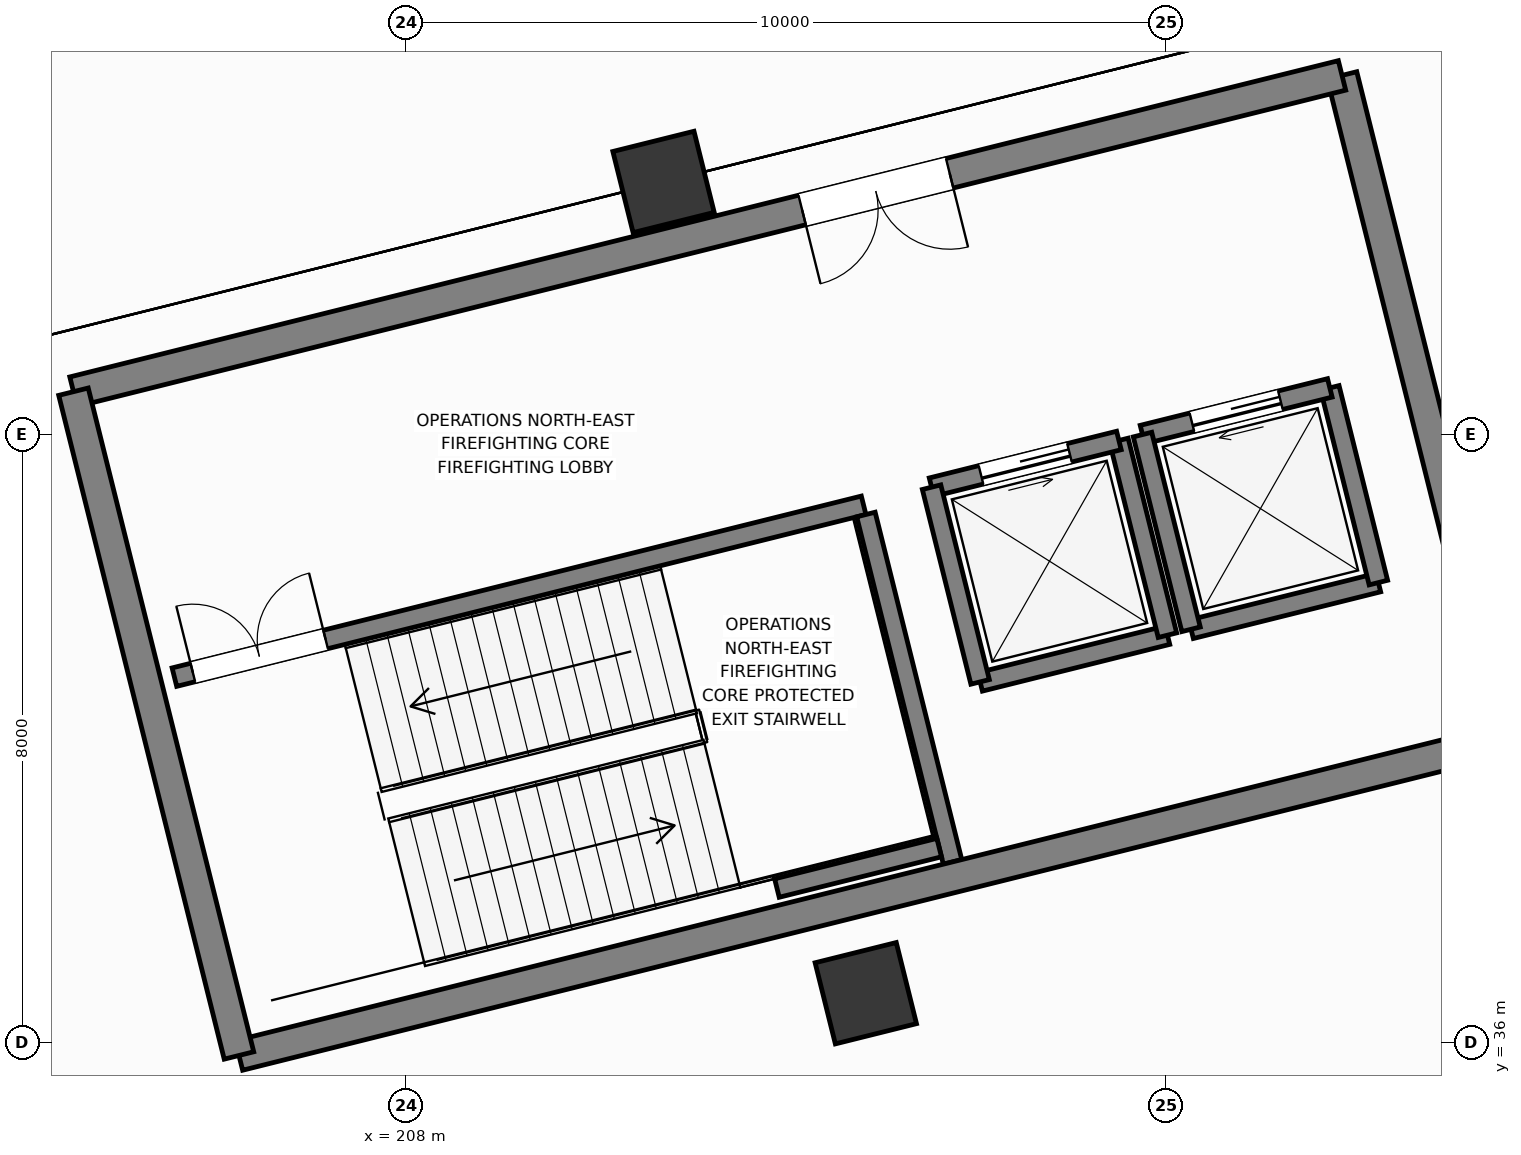
"""IFC4 building model, lengths in metres.
Left out: names, types, materials, properties, quantities, classifications, styles, units other than length and angle.
Written with IfcOpenShell. Run it as: python <this file> out.ifc"""

import sys

from ifc_helpers import new_model, si_unit, direction, frame, frame_2d, origin, origin_2d, place, context, subcontext, project, spatial, rectangle, extrude, element, fill, save


model = new_model("IFC4")
c1 = context("Model", 3, precision=1e-05, world=origin(), true_north=direction((0.0, 1.0)))
c2 = subcontext(c1, "Body", "Model", "MODEL_VIEW")
j1 = project(units=[si_unit("LENGTHUNIT", "METRE"), si_unit("PLANEANGLEUNIT", "RADIAN")], contexts=[c1])
p1 = place(None, origin())
s1 = spatial("IfcSite", under=j1, at=p1, CompositionType="ELEMENT")
p2 = place(p1, origin())
s2 = spatial("IfcBuilding", under=s1, at=p2, CompositionType="ELEMENT")
p3 = place(p2, frame((0.0, 0.0, -5.4)))
s3 = spatial("IfcBuildingStorey", under=s2, at=p3, CompositionType="ELEMENT", Elevation=-5.4)
for number, where, z_axis, x_axis in (
    (1, (214.044, 36.652, 0.0), (0.0, 0.0, 1.0), (0.97, 0.242, 0.0)),
    (2, (211.383, 47.325, 0.0), (0.0, 0.0, 1.0), (0.97, 0.242, 0.0)),
):
    element("IfcColumn", number, at=place(p3, frame(where, z_axis=z_axis, x_axis=x_axis)), inside=s3, PredefinedType="COLUMN", context=c2, shape_type="SweptSolid", body=[
        extrude(rectangle(XDim=1.1, YDim=1.1, at=origin_2d()), origin(), (0.0, 0.0, 1.0), 5.4),
    ])
p4 = place(p3, frame((215.548, 40.748, 0.0), z_axis=(0.0, 0.0, 1.0), x_axis=(0.97029284861, 0.241933436994, 0.0)))
e3 = element("IfcWall", 3, at=p4, inside=s3, PredefinedType="SOLIDWALL", context=c2, shape_type="SweptSolid", body=[
    extrude(rectangle(XDim=2.54, YDim=0.25, at=frame_2d((1.27, 0.0))), origin(), (0.0, 0.0, 1.0), 5.02),
])
p5 = place(p3, frame((218.012, 41.362, 0.0), z_axis=(0.0, 0.0, 1.0), x_axis=(-0.241938414856, 0.970291607413, 0.0)))
e4 = element("IfcWall", 4, at=p5, inside=s3, PredefinedType="SOLIDWALL", context=c2, shape_type="SweptSolid", body=[
    extrude(rectangle(XDim=2.64, YDim=0.25, at=frame_2d((1.32, 0.0))), origin(), (0.0, 0.0, 1.0), 5.02),
])
p6 = place(p3, frame((217.374, 43.924, 0.0), z_axis=(0.0, 0.0, 1.0), x_axis=(-0.97029284861, -0.241933436994, 0.0)))
e5 = element("IfcWall", 5, at=p6, inside=s3, PredefinedType="SOLIDWALL", context=c2, shape_type="SweptSolid", body=[
    extrude(rectangle(XDim=2.54, YDim=0.25, at=frame_2d((1.27, 0.0))), origin(), (0.0, 0.0, 1.0), 5.02),
])
p7 = place(p6, frame((0.67, 0.0, 0.0)))
e6 = element("IfcOpeningElement", 6, at=p7, cuts=e5, PredefinedType="OPENING", context=c2, shape_type="SweptSolid", body=[
    extrude(rectangle(XDim=1.2, YDim=2.2, at=frame_2d((0.6, 1.1))), frame((0.0, 0.135, 0.0), z_axis=(0.0, -1.0, 0.0), x_axis=(1.0, 0.0, 0.0)), (0.0, 0.0, 1.0), 0.27),
])
p8 = place(p3, frame((214.909, 43.309, 0.0), z_axis=(0.0, 0.0, 1.0), x_axis=(0.241938414856, -0.970291607413, 0.0)))
e7 = element("IfcWall", 7, at=p8, inside=s3, PredefinedType="SOLIDWALL", context=c2, shape_type="SweptSolid", body=[
    extrude(rectangle(XDim=2.64, YDim=0.25, at=frame_2d((1.32, 0.0))), origin(), (0.0, 0.0, 1.0), 5.02),
])
p9 = place(p3, frame((218.323, 41.44, 0.0), z_axis=(0.0, 0.0, 1.0), x_axis=(0.97029284861, 0.241933436994, 0.0)))
e8 = element("IfcWall", 8, at=p9, inside=s3, PredefinedType="SOLIDWALL", context=c2, shape_type="SweptSolid", body=[
    extrude(rectangle(XDim=2.54, YDim=0.25, at=frame_2d((1.27, 0.0))), origin(), (0.0, 0.0, 1.0), 5.02),
])
p10 = place(p3, frame((220.787, 42.054, 0.0), z_axis=(0.0, 0.0, 1.0), x_axis=(-0.241938414856, 0.970291607413, 0.0)))
e9 = element("IfcWall", 9, at=p10, inside=s3, PredefinedType="SOLIDWALL", context=c2, shape_type="SweptSolid", body=[
    extrude(rectangle(XDim=2.64, YDim=0.25, at=frame_2d((1.32, 0.0))), origin(), (0.0, 0.0, 1.0), 5.02),
])
p11 = place(p3, frame((220.149, 44.616, 0.0), z_axis=(0.0, 0.0, 1.0), x_axis=(-0.97029284861, -0.241933436994, 0.0)))
e10 = element("IfcWall", 10, at=p11, inside=s3, PredefinedType="SOLIDWALL", context=c2, shape_type="SweptSolid", body=[
    extrude(rectangle(XDim=2.54, YDim=0.25, at=frame_2d((1.27, 0.0))), origin(), (0.0, 0.0, 1.0), 5.02),
])
p12 = place(p11, frame((0.67, 0.0, 0.0)))
e11 = element("IfcOpeningElement", 11, at=p12, cuts=e10, PredefinedType="OPENING", context=c2, shape_type="SweptSolid", body=[
    extrude(rectangle(XDim=1.2, YDim=2.2, at=frame_2d((0.6, 1.1))), frame((0.0, 0.135, 0.0), z_axis=(0.0, -1.0, 0.0), x_axis=(1.0, 0.0, 0.0)), (0.0, 0.0, 1.0), 0.27),
])
p13 = place(p3, frame((217.684, 44.001, 0.0), z_axis=(0.0, 0.0, 1.0), x_axis=(0.241938414856, -0.970291607413, 0.0)))
e12 = element("IfcWall", 12, at=p13, inside=s3, PredefinedType="SOLIDWALL", context=c2, shape_type="SweptSolid", body=[
    extrude(rectangle(XDim=2.64, YDim=0.25, at=frame_2d((1.32, 0.0))), origin(), (0.0, 0.0, 1.0), 5.02),
])
p14 = place(p3, frame((204.948, 40.81, 0.0), z_axis=(0.0, 0.0, 1.0), x_axis=(0.970297151331, 0.241916179943, 0.0)))
e13 = element("IfcWall", 13, at=p14, inside=s3, PredefinedType="SOLIDWALL", context=c2, shape_type="SweptSolid", body=[
    extrude(rectangle(XDim=9.345, YDim=0.25, at=frame_2d((4.673, 0.0))), origin(), (0.0, 0.0, 1.0), 5.02),
])
p15 = place(p14, frame((0.25, 0.0, 0.0)))
e14 = element("IfcOpeningElement", 14, at=p15, cuts=e13, PredefinedType="OPENING", context=c2, shape_type="SweptSolid", body=[
    extrude(rectangle(XDim=1.8, YDim=2.25, at=frame_2d((0.9, 1.125))), frame((0.0, 0.135, 0.0), z_axis=(0.0, -1.0, 0.0), x_axis=(1.0, 0.0, 0.0)), (0.0, 0.0, 1.0), 0.27),
])
p16 = place(p3, frame((215.185, 38.38, 0.0), z_axis=(0.0, 0.0, 1.0), x_axis=(-0.241911120435, 0.970298412763, 0.0)))
e15 = element("IfcWall", 15, at=p16, inside=s3, PredefinedType="SOLIDWALL", context=c2, shape_type="SweptSolid", body=[
    extrude(rectangle(XDim=4.71, YDim=0.25, at=frame_2d((2.355, 0.0))), origin(), (0.0, 0.0, 1.0), 5.02),
])
p17 = place(p3, frame((212.875, 38.035, 0.0), z_axis=(0.0, 0.0, 1.0), x_axis=(0.97029738597, 0.241915238833, 0.0)))
e16 = element("IfcWall", 16, at=p17, inside=s3, PredefinedType="SOLIDWALL", context=c2, shape_type="SweptSolid", body=[
    extrude(rectangle(XDim=2.2, YDim=0.25, at=frame_2d((1.1, 0.0))), origin(), (0.0, 0.0, 1.0), 5.02),
])
p18 = place(p3, frame((205.797, 35.833, 0.0), z_axis=(0.0, 0.0, 1.0), x_axis=(0.970295179998, 0.241924086589, 0.0)))
e17 = element("IfcWall", 17, at=p18, inside=s3, PredefinedType="SHEAR", context=c2, shape_type="SweptSolid", body=[
    extrude(rectangle(XDim=17.2, YDim=0.4, at=frame_2d((8.6, 0.0))), origin(), (0.0, 0.0, 1.0), 5.02),
])
p19 = place(p3, frame((222.486, 39.994, 0.0), z_axis=(0.0, 0.0, 1.0), x_axis=(-0.241923808098, 0.970295249435, 0.0)))
e18 = element("IfcWall", 18, at=p19, inside=s3, PredefinedType="SHEAR", context=c2, shape_type="SweptSolid", body=[
    extrude(rectangle(XDim=9.0, YDim=0.4, at=frame_2d((4.5, 0.0))), origin(), (0.0, 0.0, 1.0), 5.02),
])
p20 = place(p3, frame((220.309, 48.727, 0.0), z_axis=(0.0, 0.0, 1.0), x_axis=(-0.970296544738, -0.241918612906, 0.0)))
e19 = element("IfcWall", 19, at=p20, inside=s3, PredefinedType="SHEAR", context=c2, shape_type="SweptSolid", body=[
    extrude(rectangle(XDim=17.2, YDim=0.4, at=frame_2d((8.6, 0.0))), origin(), (0.0, 0.0, 1.0), 5.02),
])
p21 = place(p20, frame((5.32, 0.0, 0.0)))
e20 = element("IfcOpeningElement", 20, at=p21, cuts=e19, PredefinedType="OPENING", context=c2, shape_type="SweptSolid", body=[
    extrude(rectangle(XDim=2.0, YDim=2.3, at=frame_2d((1.0, 1.15))), frame((0.0, 0.21, 0.0), z_axis=(0.0, -1.0, 0.0), x_axis=(1.0, 0.0, 0.0)), (0.0, 0.0, 1.0), 0.42),
])
p22 = place(p3, frame((203.62, 44.566, 0.0), z_axis=(0.0, 0.0, 1.0), x_axis=(0.241921199913, -0.97029589973, 0.0)))
e21 = element("IfcWall", 21, at=p22, inside=s3, PredefinedType="SHEAR", context=c2, shape_type="SweptSolid", body=[
    extrude(rectangle(XDim=9.0, YDim=0.4, at=frame_2d((4.5, 0.0))), origin(), (0.0, 0.0, 1.0), 5.02),
])
p23 = place(p7, origin())
e22 = element("IfcDoor", 22, at=p23, inside=s3, OperationType="SLIDING_TO_LEFT", PredefinedType="DOOR", context=c2, shape_type="SweptSolid", body=[
    extrude(rectangle(XDim=1.2, YDim=2.2, at=frame_2d((0.6, 1.1))), frame((0.0, 0.025, 0.0), z_axis=(0.0, -1.0, 0.0), x_axis=(1.0, 0.0, 0.0)), (0.0, 0.0, 1.0), 0.05),
])
fill(e6, e22)
p24 = place(p12, origin())
e23 = element("IfcDoor", 23, at=p24, inside=s3, OperationType="SLIDING_TO_RIGHT", PredefinedType="DOOR", context=c2, shape_type="SweptSolid", body=[
    extrude(rectangle(XDim=1.2, YDim=2.2, at=frame_2d((0.6, 1.1))), frame((0.0, 0.025, 0.0), z_axis=(0.0, -1.0, 0.0), x_axis=(1.0, 0.0, 0.0)), (0.0, 0.0, 1.0), 0.05),
])
fill(e11, e23)
p25 = place(p15, origin())
e24 = element("IfcDoor", 24, at=p25, inside=s3, OperationType="DOUBLE_DOOR_SINGLE_SWING", PredefinedType="DOOR", context=c2, shape_type="SweptSolid", body=[
    extrude(rectangle(XDim=1.8, YDim=2.25, at=frame_2d((0.9, 1.125))), frame((0.0, 0.025, 0.0), z_axis=(0.0, -1.0, 0.0), x_axis=(1.0, 0.0, 0.0)), (0.0, 0.0, 1.0), 0.05),
])
fill(e14, e24)
p26 = place(p21, origin())
e25 = element("IfcDoor", 25, at=p26, inside=s3, OperationType="DOUBLE_DOOR_SINGLE_SWING", PredefinedType="DOOR", context=c2, shape_type="SweptSolid", body=[
    extrude(rectangle(XDim=2.0, YDim=2.3, at=frame_2d((1.0, 1.15))), frame((0.0, 0.025, 0.0), z_axis=(0.0, -1.0, 0.0), x_axis=(1.0, 0.0, 0.0)), (0.0, 0.0, 1.0), 0.05),
])
fill(e20, e25)
save(model, sys.argv[1])
